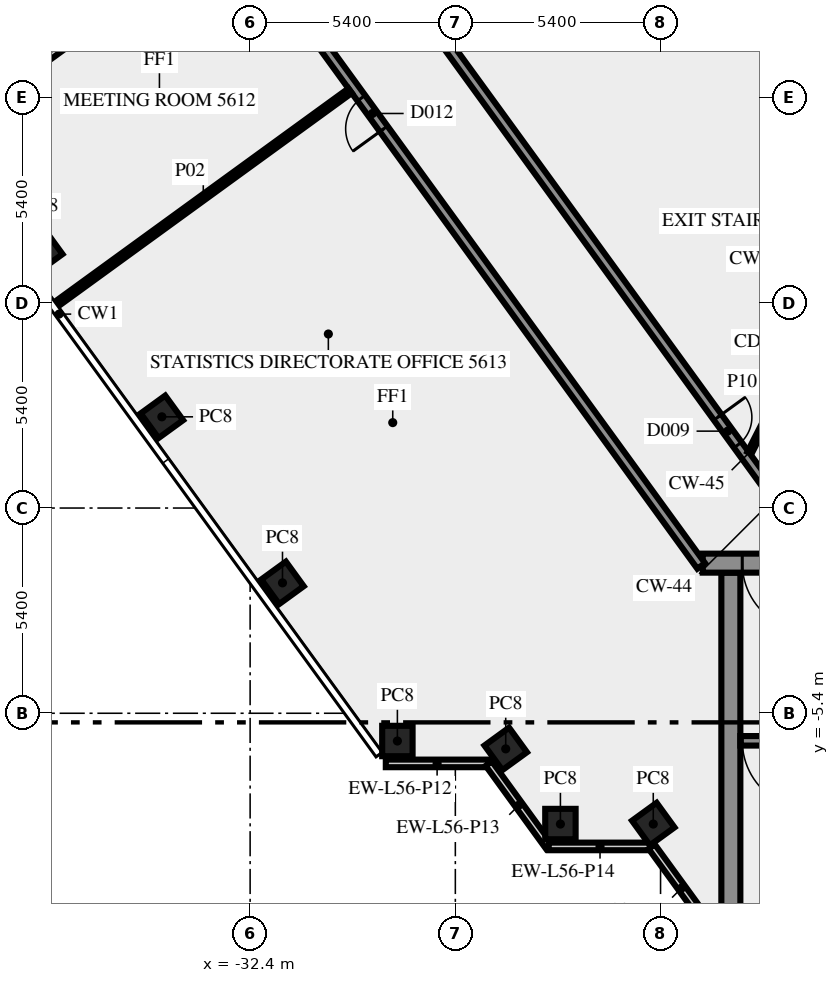
"""IFC4 building model, lengths in metres.
Left out: names, types, materials, properties, quantities, classifications, styles, units other than length and angle.
Written with IfcOpenShell. Run it as: python <this file> out.ifc"""

import sys

from ifc_helpers import new_model, si_unit, direction, frame, frame_2d, origin, origin_2d, place, context, subcontext, project, spatial, rectangle, extrude, element, fill, save


model = new_model("IFC4")
c1 = context("Model", 3, precision=1e-05, world=origin(), true_north=direction((0.0, 1.0)))
c2 = subcontext(c1, "Body", "Model", "MODEL_VIEW")
j1 = project(units=[si_unit("LENGTHUNIT", "METRE"), si_unit("PLANEANGLEUNIT", "RADIAN")], contexts=[c1])
p1 = place(None, origin())
s1 = spatial("IfcSite", under=j1, at=p1, CompositionType="ELEMENT")
p2 = place(p1, origin())
s2 = spatial("IfcBuilding", under=s1, at=p2, CompositionType="ELEMENT")
p3 = place(p2, frame((0.0, 0.0, 238.0)))
s3 = spatial("IfcBuildingStorey", under=s2, at=p3, CompositionType="ELEMENT", Elevation=238.0)
for number, where, z_axis, x_axis in (
    (1, (-37.896, 6.769, 0.0), (0.0, 0.0, 1.0), (0.588, -0.809, 0.0)),
    (2, (-34.722, 2.4, 0.0), (0.0, 0.0, 1.0), (0.588, -0.809, 0.0)),
    (3, (-31.548, -1.969, 0.0), (0.0, 0.0, 1.0), (0.588, -0.809, 0.0)),
    (4, (-28.525, -6.13, 0.0), (0.0, 0.0, 1.0), (1.0, 0.0, 0.0)),
    (5, (-25.674, -6.337, 0.0), (0.0, 0.0, 1.0), (0.588, -0.809, 0.0)),
    (6, (-24.235, -8.315, 0.0), (0.0, 0.0, 1.0), (1.0, 0.0, 0.0)),
    (7, (-21.792, -8.315, 0.0), (0.0, 0.0, 1.0), (0.588, -0.809, 0.0)),
):
    element("IfcColumn", number, at=place(p3, frame(where, z_axis=z_axis, x_axis=x_axis)), inside=s3, PredefinedType="COLUMN", context=c2, shape_type="SweptSolid", body=[
        extrude(rectangle(XDim=0.8, YDim=0.8, at=origin_2d()), origin(), (0.0, 0.0, 1.0), 3.4),
    ])
p4 = place(p3, frame((-28.83, -6.719, 0.0), z_axis=(0.0, 0.0, 1.0), x_axis=(1.0, 0.0, 0.0)))
e8 = element("IfcWall", 8, at=p4, inside=s3, PredefinedType="SOLIDWALL", context=c2, shape_type="SweptSolid", body=[
    extrude(rectangle(XDim=2.7, YDim=0.2, at=frame_2d((1.35, 0.0))), origin(), (0.0, 0.0, 1.0), 3.4),
])
p5 = place(p3, frame((-26.12, -6.724, 0.0), z_axis=(0.0, 0.0, 1.0), x_axis=(0.587720002413, -0.809064397168, 0.0)))
e9 = element("IfcWall", 9, at=p5, inside=s3, PredefinedType="SOLIDWALL", context=c2, shape_type="SweptSolid", body=[
    extrude(rectangle(XDim=2.7, YDim=0.2, at=frame_2d((1.35, 0.0))), origin(), (0.0, 0.0, 1.0), 3.4),
])
p6 = place(p3, frame((-24.543, -8.904, 0.0), z_axis=(0.0, 0.0, 1.0), x_axis=(1.0, 0.0, 0.0)))
e10 = element("IfcWall", 10, at=p6, inside=s3, PredefinedType="SOLIDWALL", context=c2, shape_type="SweptSolid", body=[
    extrude(rectangle(XDim=2.7, YDim=0.2, at=frame_2d((1.35, 0.0))), origin(), (0.0, 0.0, 1.0), 3.4),
])
p7 = place(p3, frame((-21.833, -8.909, 0.0), z_axis=(0.0, 0.0, 1.0), x_axis=(0.587766567315, -0.809030569476, 0.0)))
e11 = element("IfcWall", 11, at=p7, inside=s3, PredefinedType="SOLIDWALL", context=c2, shape_type="SweptSolid", body=[
    extrude(rectangle(XDim=2.688, YDim=0.2, at=frame_2d((1.344, 0.0))), origin(), (0.0, 0.0, 1.0), 3.4),
])
p8 = place(p3, frame((-19.75, -10.5, 0.0), z_axis=(0.0, 0.0, 1.0), x_axis=(0.0, 1.0, 0.0)))
e12 = element("IfcWall", 12, at=p8, inside=s3, PredefinedType="SHEAR", context=c2, shape_type="SweptSolid", body=[
    extrude(rectangle(XDim=8.8, YDim=0.5, at=frame_2d((4.4, 0.0))), origin(), (0.0, 0.0, 1.0), 3.4),
])
p9 = place(p3, frame((-11.45, -6.125, 0.0), z_axis=(0.0, 0.0, 1.0), x_axis=(-1.0, 0.0, 0.0)))
e13 = element("IfcWall", 13, at=p9, inside=s3, PredefinedType="SHEAR", context=c2, shape_type="SweptSolid", body=[
    extrude(rectangle(XDim=8.05, YDim=0.25, at=frame_2d((4.025, 0.0))), origin(), (0.0, 0.0, 1.0), 3.4),
])
p10 = place(p9, frame((6.2, 0.0, 0.0)))
e14 = element("IfcOpeningElement", 14, at=p10, cuts=e13, PredefinedType="OPENING", context=c2, shape_type="SweptSolid", body=[
    extrude(rectangle(XDim=1.8, YDim=2.1, at=frame_2d((0.9, 1.05))), frame((0.0, 0.135, 0.0), z_axis=(0.0, -1.0, 0.0), x_axis=(1.0, 0.0, 0.0)), (0.0, 0.0, 1.0), 0.27),
])
p11 = place(p3, frame((20.49, -1.45, 0.0), z_axis=(0.0, 0.0, 1.0), x_axis=(-1.0, 0.0, 0.0)))
e15 = element("IfcWall", 15, at=p11, inside=s3, PredefinedType="SHEAR", context=c2, shape_type="SweptSolid", body=[
    extrude(rectangle(XDim=40.98, YDim=0.5, at=frame_2d((20.49, 0.0))), origin(), (0.0, 0.0, 1.0), 3.4),
])
p12 = place(p11, frame((38.14, 0.0, 0.0)))
e16 = element("IfcOpeningElement", 16, at=p12, cuts=e15, PredefinedType="OPENING", context=c2, shape_type="SweptSolid", body=[
    extrude(rectangle(XDim=1.8, YDim=2.1, at=frame_2d((0.9, 1.05))), frame((0.0, 0.26, 0.0), z_axis=(0.0, -1.0, 0.0), x_axis=(1.0, 0.0, 0.0)), (0.0, 0.0, 1.0), 0.52),
])
p13 = place(p11, frame((36.728, 0.0, 0.0)))
e17 = element("IfcOpeningElement", 17, at=p13, cuts=e15, PredefinedType="OPENING", context=c2, shape_type="SweptSolid", body=[
    extrude(rectangle(XDim=0.8, YDim=2.1, at=frame_2d((0.4, 1.05))), frame((0.0, 0.26, 0.0), z_axis=(0.0, -1.0, 0.0), x_axis=(1.0, 0.0, 0.0)), (0.0, 0.0, 1.0), 0.52),
])
p14 = place(p11, frame((35.153, 0.0, 0.0)))
e18 = element("IfcOpeningElement", 18, at=p14, cuts=e15, PredefinedType="OPENING", context=c2, shape_type="SweptSolid", body=[
    extrude(rectangle(XDim=0.8, YDim=2.1, at=frame_2d((0.4, 1.05))), frame((0.0, 0.26, 0.0), z_axis=(0.0, -1.0, 0.0), x_axis=(1.0, 0.0, 0.0)), (0.0, 0.0, 1.0), 0.52),
])
p15 = place(p11, frame((32.94, 0.0, 0.0)))
e19 = element("IfcOpeningElement", 19, at=p15, cuts=e15, PredefinedType="OPENING", context=c2, shape_type="SweptSolid", body=[
    extrude(rectangle(XDim=0.9, YDim=2.1, at=frame_2d((0.45, 1.05))), frame((0.0, 0.26, 0.0), z_axis=(0.0, -1.0, 0.0), x_axis=(1.0, 0.0, 0.0)), (0.0, 0.0, 1.0), 0.52),
])
p16 = place(p11, frame((29.603, 0.0, 0.0)))
e20 = element("IfcOpeningElement", 20, at=p16, cuts=e15, PredefinedType="OPENING", context=c2, shape_type="SweptSolid", body=[
    extrude(rectangle(XDim=0.9, YDim=2.1, at=frame_2d((0.45, 1.05))), frame((0.0, 0.26, 0.0), z_axis=(0.0, -1.0, 0.0), x_axis=(1.0, 0.0, 0.0)), (0.0, 0.0, 1.0), 0.52),
])
p17 = place(p11, frame((25.877, 0.0, 0.0)))
e21 = element("IfcOpeningElement", 21, at=p17, cuts=e15, PredefinedType="OPENING", context=c2, shape_type="SweptSolid", body=[
    extrude(rectangle(XDim=0.9, YDim=2.1, at=frame_2d((0.45, 1.05))), frame((0.0, 0.26, 0.0), z_axis=(0.0, -1.0, 0.0), x_axis=(1.0, 0.0, 0.0)), (0.0, 0.0, 1.0), 0.52),
])
p18 = place(p11, frame((19.59, 0.0, 0.0)))
e22 = element("IfcOpeningElement", 22, at=p18, cuts=e15, PredefinedType="OPENING", context=c2, shape_type="SweptSolid", body=[
    extrude(rectangle(XDim=2.0, YDim=2.1, at=frame_2d((1.0, 1.05))), frame((0.0, 0.26, 0.0), z_axis=(0.0, -1.0, 0.0), x_axis=(1.0, 0.0, 0.0)), (0.0, 0.0, 1.0), 0.52),
])
p19 = place(p11, frame((7.14, 0.0, 0.0)))
e23 = element("IfcOpeningElement", 23, at=p19, cuts=e15, PredefinedType="OPENING", context=c2, shape_type="SweptSolid", body=[
    extrude(rectangle(XDim=0.9, YDim=2.1, at=frame_2d((0.45, 1.05))), frame((0.0, 0.26, 0.0), z_axis=(0.0, -1.0, 0.0), x_axis=(1.0, 0.0, 0.0)), (0.0, 0.0, 1.0), 0.52),
])
p20 = place(p11, frame((4.19, 0.0, 0.0)))
e24 = element("IfcOpeningElement", 24, at=p20, cuts=e15, PredefinedType="OPENING", context=c2, shape_type="SweptSolid", body=[
    extrude(rectangle(XDim=0.9, YDim=2.1, at=frame_2d((0.45, 1.05))), frame((0.0, 0.26, 0.0), z_axis=(0.0, -1.0, 0.0), x_axis=(1.0, 0.0, 0.0)), (0.0, 0.0, 1.0), 0.52),
])
p21 = place(p11, frame((1.04, 0.0, 0.0)))
e25 = element("IfcOpeningElement", 25, at=p21, cuts=e15, PredefinedType="OPENING", context=c2, shape_type="SweptSolid", body=[
    extrude(rectangle(XDim=1.8, YDim=2.1, at=frame_2d((0.9, 1.05))), frame((0.0, 0.26, 0.0), z_axis=(0.0, -1.0, 0.0), x_axis=(1.0, 0.0, 0.0)), (0.0, 0.0, 1.0), 0.52),
])
p22 = place(p3, frame((-20.531, -1.523, 0.0), z_axis=(0.0, 0.0, 1.0), x_axis=(-0.587781654618, 0.809019608226, 0.0)))
e26 = element("IfcWall", 26, at=p22, inside=s3, PredefinedType="SOLIDWALL", context=c2, shape_type="SweptSolid", body=[
    extrude(rectangle(XDim=33.911, YDim=0.25, at=frame_2d((16.956, 0.0))), origin(), (0.0, 0.0, 1.0), 3.4),
])
p23 = place(p22, frame((14.216, 0.0, 0.0)))
e27 = element("IfcOpeningElement", 27, at=p23, cuts=e26, PredefinedType="OPENING", context=c2, shape_type="SweptSolid", body=[
    extrude(rectangle(XDim=1.0, YDim=2.1, at=frame_2d((0.5, 1.05))), frame((0.0, 0.135, 0.0), z_axis=(0.0, -1.0, 0.0), x_axis=(1.0, 0.0, 0.0)), (0.0, 0.0, 1.0), 0.27),
])
p24 = place(p22, frame((19.715, 0.0, 0.0)))
e28 = element("IfcOpeningElement", 28, at=p24, cuts=e26, PredefinedType="OPENING", context=c2, shape_type="SweptSolid", body=[
    extrude(rectangle(XDim=0.9, YDim=2.1, at=frame_2d((0.45, 1.05))), frame((0.0, 0.135, 0.0), z_axis=(0.0, -1.0, 0.0), x_axis=(1.0, 0.0, 0.0)), (0.0, 0.0, 1.0), 0.27),
])
p25 = place(p22, frame((21.316, 0.0, 0.0)))
e29 = element("IfcOpeningElement", 29, at=p25, cuts=e26, PredefinedType="OPENING", context=c2, shape_type="SweptSolid", body=[
    extrude(rectangle(XDim=0.9, YDim=2.1, at=frame_2d((0.45, 1.05))), frame((0.0, 0.135, 0.0), z_axis=(0.0, -1.0, 0.0), x_axis=(1.0, 0.0, 0.0)), (0.0, 0.0, 1.0), 0.27),
])
p26 = place(p3, frame((-38.32, 27.469, 0.0), z_axis=(0.0, 0.0, 1.0), x_axis=(0.587788021768, -0.809014982226, 0.0)))
e30 = element("IfcWall", 30, at=p26, inside=s3, PredefinedType="SOLIDWALL", context=c2, shape_type="SweptSolid", body=[
    extrude(rectangle(XDim=35.344, YDim=0.25, at=frame_2d((17.672, 0.0))), origin(), (0.0, 0.0, 1.0), 3.4),
])
p27 = place(p26, frame((31.003, 0.0, 0.0)))
e31 = element("IfcOpeningElement", 31, at=p27, cuts=e30, PredefinedType="OPENING", context=c2, shape_type="SweptSolid", body=[
    extrude(rectangle(XDim=0.9, YDim=2.1, at=frame_2d((0.45, 1.05))), frame((0.0, 0.135, 0.0), z_axis=(0.0, -1.0, 0.0), x_axis=(1.0, 0.0, 0.0)), (0.0, 0.0, 1.0), 0.27),
])
p28 = place(p26, frame((11.286, 0.0, 0.0)))
e32 = element("IfcOpeningElement", 32, at=p28, cuts=e30, PredefinedType="OPENING", context=c2, shape_type="SweptSolid", body=[
    extrude(rectangle(XDim=0.9, YDim=2.1, at=frame_2d((0.45, 1.05))), frame((0.0, 0.135, 0.0), z_axis=(0.0, -1.0, 0.0), x_axis=(1.0, 0.0, 0.0)), (0.0, 0.0, 1.0), 0.27),
])
p29 = place(p3, frame((-29.769, 10.98, 0.0), z_axis=(0.0, 0.0, 1.0), x_axis=(-0.809048817734, -0.587741448702, 0.0)))
e33 = element("IfcWall", 33, at=p29, inside=s3, PredefinedType="PARTITIONING", context=c2, shape_type="SweptSolid", body=[
    extrude(rectangle(XDim=9.55, YDim=0.15, at=frame_2d((4.775, 0.0))), origin(), (0.0, 0.0, 1.0), 2.6),
])
p30 = place(p3, frame((-32.943, 15.349, 0.0), z_axis=(0.0, 0.0, 1.0), x_axis=(-0.80903787798, -0.587756507402, 0.0)))
e34 = element("IfcWall", 34, at=p30, inside=s3, PredefinedType="SOLIDWALL", context=c2, shape_type="SweptSolid", body=[
    extrude(rectangle(XDim=9.652, YDim=0.2, at=frame_2d((4.826, 0.0))), origin(), (0.0, 0.0, 1.0), 2.6),
])
p31 = place(p3, frame((-19.261, 1.45, 0.0), z_axis=(0.0, 0.0, 1.0), x_axis=(0.453950796792, 0.891026752736, 0.0)))
e35 = element("IfcWall", 35, at=p31, inside=s3, PredefinedType="PARTITIONING", context=c2, shape_type="SweptSolid", body=[
    extrude(rectangle(XDim=2.778, YDim=0.12, at=frame_2d((1.389, 0.0))), origin(), (0.0, 0.0, 1.0), 3.4),
])
p32 = place(p10, origin())
e36 = element("IfcDoor", 36, at=p32, inside=s3, OperationType="DOUBLE_DOOR_SINGLE_SWING", PredefinedType="DOOR", context=c2, shape_type="SweptSolid", body=[
    extrude(rectangle(XDim=1.8, YDim=2.1, at=frame_2d((0.9, 1.05))), frame((0.0, 0.025, 0.0), z_axis=(0.0, -1.0, 0.0), x_axis=(1.0, 0.0, 0.0)), (0.0, 0.0, 1.0), 0.05),
])
fill(e14, e36)
p33 = place(p12, origin())
e37 = element("IfcDoor", 37, at=p33, inside=s3, OperationType="DOUBLE_DOOR_SINGLE_SWING", PredefinedType="DOOR", context=c2, shape_type="SweptSolid", body=[
    extrude(rectangle(XDim=1.8, YDim=2.1, at=frame_2d((0.9, 1.05))), frame((0.0, 0.025, 0.0), z_axis=(0.0, -1.0, 0.0), x_axis=(1.0, 0.0, 0.0)), (0.0, 0.0, 1.0), 0.05),
])
fill(e16, e37)
p34 = place(p23, origin())
e38 = element("IfcDoor", 38, at=p34, inside=s3, OperationType="SINGLE_SWING_RIGHT", PredefinedType="DOOR", context=c2, shape_type="SweptSolid", body=[
    extrude(rectangle(XDim=1.0, YDim=2.1, at=frame_2d((0.5, 1.05))), frame((0.0, 0.025, 0.0), z_axis=(0.0, -1.0, 0.0), x_axis=(1.0, 0.0, 0.0)), (0.0, 0.0, 1.0), 0.05),
])
fill(e27, e38)
p35 = place(p27, origin())
e39 = element("IfcDoor", 39, at=p35, inside=s3, OperationType="SINGLE_SWING_RIGHT", PredefinedType="DOOR", context=c2, shape_type="SweptSolid", body=[
    extrude(rectangle(XDim=0.9, YDim=2.1, at=frame_2d((0.45, 1.05))), frame((0.0, 0.025, 0.0), z_axis=(0.0, -1.0, 0.0), x_axis=(1.0, 0.0, 0.0)), (0.0, 0.0, 1.0), 0.05),
])
fill(e31, e39)
save(model, sys.argv[1])
